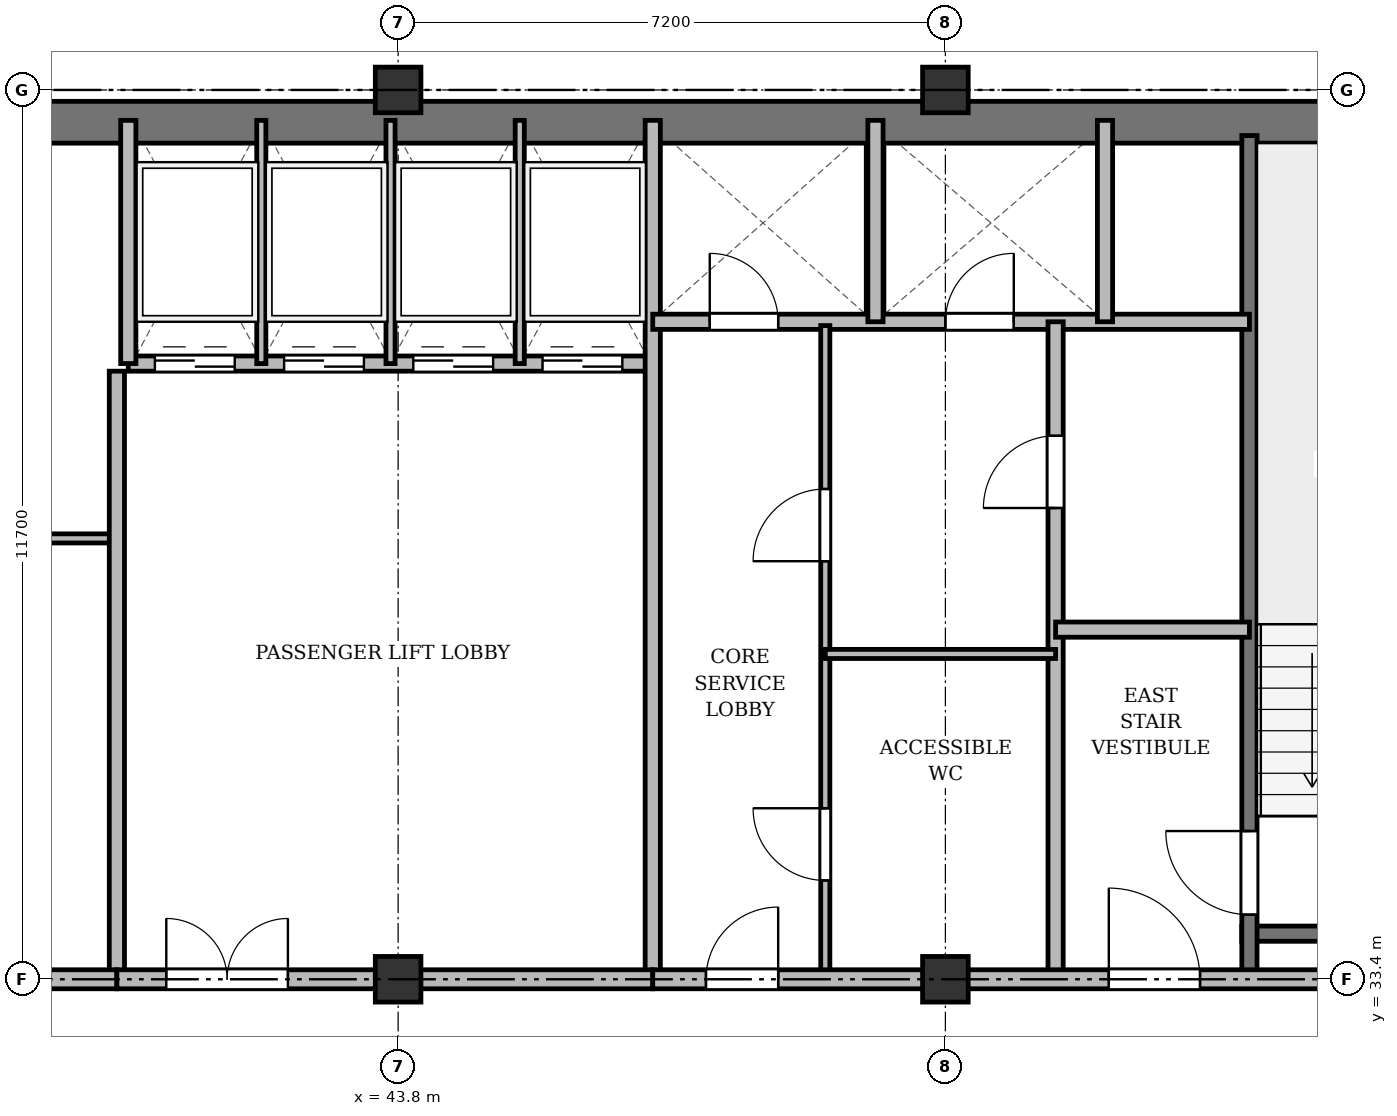
"""IFC4 building model, lengths in metres.
Left out: names, types, materials, properties, quantities, classifications, styles, units other than length and angle.
Written with IfcOpenShell. Run it as: python <this file> out.ifc"""

import sys

from ifc_helpers import new_model, si_unit, direction, frame, frame_2d, origin, origin_2d, place, context, subcontext, project, spatial, rectangle, extrude, source, transform, mapped, element, fill, save


model = new_model("IFC4")
c1 = context("Model", 3, precision=1e-05, world=origin(), true_north=direction((0.0, 1.0)))
c2 = subcontext(c1, "Body", "Model", "MODEL_VIEW")
j1 = project(units=[si_unit("LENGTHUNIT", "METRE"), si_unit("PLANEANGLEUNIT", "RADIAN")], contexts=[c1])
p1 = place(None, origin())
s1 = spatial("IfcSite", under=j1, at=p1, CompositionType="ELEMENT")
p2 = place(p1, origin())
s2 = spatial("IfcBuilding", under=s1, at=p2, CompositionType="ELEMENT")
p3 = place(p2, frame((0.0, 0.0, 291.9)))
s3 = spatial("IfcBuildingStorey", under=s2, at=p3, CompositionType="ELEMENT", Elevation=291.9)
m1 = source(origin(), c2, "Body", "SweptSolid", [
    extrude(rectangle(XDim=0.6, YDim=0.6, at=origin_2d()), origin(), (0.0, 0.0, 1.0), 3.6),
])
for number, where, z_axis, x_axis in (
    (1, (43.8, 33.4, 0.0), (0.0, 0.0, 1.0), (1.0, 0.0, 0.0)),
    (2, (43.8, 45.1, 0.0), (0.0, 0.0, 1.0), (1.0, 0.0, 0.0)),
    (3, (51.0, 33.4, 0.0), (0.0, 0.0, 1.0), (1.0, 0.0, 0.0)),
    (4, (51.0, 45.1, 0.0), (0.0, 0.0, 1.0), (1.0, 0.0, 0.0)),
):
    element("IfcColumn", number, at=place(p3, frame(where, z_axis=z_axis, x_axis=x_axis)), inside=s3, PredefinedType="COLUMN", context=c2, shape_type="MappedRepresentation", body=[
        mapped(m1, transform((0.0, 0.0, 0.0), x_axis=(1.0, 0.0, 0.0), y_axis=(0.0, 1.0, 0.0), z_axis=(0.0, 0.0, 1.0), scale=1.0)),
    ])
p4 = place(p3, frame((15.65, 44.675, 0.0), z_axis=(0.0, 0.0, 1.0), x_axis=(1.0, 0.0, 0.0)))
e5 = element("IfcWall", 5, at=p4, inside=s3, PredefinedType="SHEAR", context=c2, shape_type="SweptSolid", body=[
    extrude(rectangle(XDim=43.1, YDim=0.55, at=frame_2d((21.55, 0.0))), origin(), (0.0, 0.0, 1.0), 3.18),
])
p5 = place(p3, frame((54.9, 34.0, 0.0), z_axis=(0.0, 0.0, 1.0), x_axis=(1.0, 0.0, 0.0)))
e6 = element("IfcWall", 6, at=p5, inside=s3, PredefinedType="SHEAR", context=c2, shape_type="SweptSolid", body=[
    extrude(rectangle(XDim=3.4, YDim=0.2, at=frame_2d((1.7, 0.0))), origin(), (0.0, 0.0, 1.0), 3.18),
])
p6 = place(p3, frame((55.0, 33.4, 0.0), z_axis=(0.0, 0.0, 1.0), x_axis=(0.0, 1.0, 0.0)))
e7 = element("IfcWall", 7, at=p6, inside=s3, PredefinedType="SHEAR", context=c2, shape_type="SweptSolid", body=[
    extrude(rectangle(XDim=11.1, YDim=0.2, at=frame_2d((5.55, 0.0))), origin(), (0.0, 0.0, 1.0), 3.18),
])
p7 = place(p6, frame((0.85, 0.0, 0.0)))
e8 = element("IfcOpeningElement", 8, at=p7, cuts=e7, PredefinedType="OPENING", context=c2, shape_type="SweptSolid", body=[
    extrude(rectangle(XDim=1.1, YDim=2.15, at=frame_2d((0.55, 1.075))), frame((0.0, 0.11, 0.0), z_axis=(0.0, -1.0, 0.0), x_axis=(1.0, 0.0, 0.0)), (0.0, 0.0, 1.0), 0.22),
])
p8 = place(p3, frame((33.3, 39.2, 0.0), z_axis=(0.0, 0.0, 1.0), x_axis=(1.0, 0.0, 0.0)))
e9 = element("IfcWall", 9, at=p8, inside=s3, PredefinedType="PARTITIONING", context=c2, shape_type="SweptSolid", body=[
    extrude(rectangle(XDim=6.8, YDim=0.12, at=frame_2d((3.4, 0.0))), origin(), (0.0, 0.0, 1.0), 3.18),
])
p9 = place(p8, frame((2.6, 0.0, 0.0)))
e10 = element("IfcOpeningElement", 10, at=p9, cuts=e9, PredefinedType="OPENING", context=c2, shape_type="SweptSolid", body=[
    extrude(rectangle(XDim=0.95, YDim=2.15, at=frame_2d((0.475, 1.075))), frame((0.0, 0.07, 0.0), z_axis=(0.0, -1.0, 0.0), x_axis=(1.0, 0.0, 0.0)), (0.0, 0.0, 1.0), 0.14),
])
p10 = place(p3, frame((40.1, 33.4, 0.0), z_axis=(0.0, 0.0, 1.0), x_axis=(0.0, 1.0, 0.0)))
e11 = element("IfcWall", 11, at=p10, inside=s3, PredefinedType="SOLIDWALL", context=c2, shape_type="SweptSolid", body=[
    extrude(rectangle(XDim=8.0, YDim=0.2, at=frame_2d((4.0, 0.0))), origin(), (0.0, 0.0, 1.0), 2.73),
])
p11 = place(p3, frame((40.25, 41.5, 0.0), z_axis=(0.0, 0.0, 1.0), x_axis=(1.0, 0.0, 0.0)))
e12 = element("IfcWall", 12, at=p11, inside=s3, PredefinedType="SOLIDWALL", context=c2, shape_type="SweptSolid", body=[
    extrude(rectangle(XDim=6.9, YDim=0.2, at=frame_2d((3.45, 0.0))), origin(), (0.0, 0.0, 1.0), 3.18),
])
p12 = place(p11, frame((0.35, 0.0, 0.0)))
e13 = element("IfcOpeningElement", 13, at=p12, cuts=e12, PredefinedType="OPENING", context=c2, shape_type="SweptSolid", body=[
    extrude(rectangle(XDim=1.05, YDim=2.15, at=frame_2d((0.525, 1.075))), frame((0.0, 0.11, 0.0), z_axis=(0.0, -1.0, 0.0), x_axis=(1.0, 0.0, 0.0)), (0.0, 0.0, 1.0), 0.22),
])
p13 = place(p11, frame((2.05, 0.0, 0.0)))
e14 = element("IfcOpeningElement", 14, at=p13, cuts=e12, PredefinedType="OPENING", context=c2, shape_type="SweptSolid", body=[
    extrude(rectangle(XDim=1.05, YDim=2.15, at=frame_2d((0.525, 1.075))), frame((0.0, 0.11, 0.0), z_axis=(0.0, -1.0, 0.0), x_axis=(1.0, 0.0, 0.0)), (0.0, 0.0, 1.0), 0.22),
])
p14 = place(p11, frame((3.75, 0.0, 0.0)))
e15 = element("IfcOpeningElement", 15, at=p14, cuts=e12, PredefinedType="OPENING", context=c2, shape_type="SweptSolid", body=[
    extrude(rectangle(XDim=1.05, YDim=2.15, at=frame_2d((0.525, 1.075))), frame((0.0, 0.11, 0.0), z_axis=(0.0, -1.0, 0.0), x_axis=(1.0, 0.0, 0.0)), (0.0, 0.0, 1.0), 0.22),
])
p15 = place(p11, frame((5.45, 0.0, 0.0)))
e16 = element("IfcOpeningElement", 16, at=p15, cuts=e12, PredefinedType="OPENING", context=c2, shape_type="SweptSolid", body=[
    extrude(rectangle(XDim=1.05, YDim=2.15, at=frame_2d((0.525, 1.075))), frame((0.0, 0.11, 0.0), z_axis=(0.0, -1.0, 0.0), x_axis=(1.0, 0.0, 0.0)), (0.0, 0.0, 1.0), 0.22),
])
p16 = place(p3, frame((40.25, 41.5, 0.0), z_axis=(0.0, 0.0, 1.0), x_axis=(0.0, 1.0, 0.0)))
e17 = element("IfcWall", 17, at=p16, inside=s3, PredefinedType="SOLIDWALL", context=c2, shape_type="SweptSolid", body=[
    extrude(rectangle(XDim=3.2, YDim=0.2, at=frame_2d((1.6, 0.0))), origin(), (0.0, 0.0, 1.0), 3.18),
])
for number, where, z_axis, x_axis in (
    (18, (42.0, 41.5, 0.0), (0.0, 0.0, 1.0), (0.0, 1.0, 0.0)),
    (19, (43.7, 41.5, 0.0), (0.0, 0.0, 1.0), (0.0, 1.0, 0.0)),
    (20, (45.4, 41.5, 0.0), (0.0, 0.0, 1.0), (0.0, 1.0, 0.0)),
):
    element("IfcWall", number, at=place(p3, frame(where, z_axis=z_axis, x_axis=x_axis)), inside=s3, PredefinedType="PARTITIONING", context=c2, shape_type="SweptSolid", body=[
        extrude(rectangle(XDim=3.2, YDim=0.12, at=frame_2d((1.6, 0.0))), origin(), (0.0, 0.0, 1.0), 3.18),
    ])
p17 = place(p3, frame((47.15, 33.4, 0.0), z_axis=(0.0, 0.0, 1.0), x_axis=(0.0, 1.0, 0.0)))
e21 = element("IfcWall", 21, at=p17, inside=s3, PredefinedType="SOLIDWALL", context=c2, shape_type="SweptSolid", body=[
    extrude(rectangle(XDim=11.3, YDim=0.2, at=frame_2d((5.65, 0.0))), origin(), (0.0, 0.0, 1.0), 2.73),
])
p18 = place(p3, frame((33.3, 33.4, 0.0), z_axis=(0.0, 0.0, 1.0), x_axis=(1.0, 0.0, 0.0)))
e22 = element("IfcWall", 22, at=p18, inside=s3, PredefinedType="PARTITIONING", context=c2, shape_type="SweptSolid", body=[
    extrude(rectangle(XDim=6.8, YDim=0.25, at=frame_2d((3.4, 0.0))), origin(), (0.0, 0.0, 1.0), 2.73),
])
p19 = place(p18, frame((2.4, 0.0, 0.0)))
e23 = element("IfcOpeningElement", 23, at=p19, cuts=e22, PredefinedType="OPENING", context=c2, shape_type="SweptSolid", body=[
    extrude(rectangle(XDim=1.0, YDim=2.15, at=frame_2d((0.5, 1.075))), frame((0.0, 0.135, 0.0), z_axis=(0.0, -1.0, 0.0), x_axis=(1.0, 0.0, 0.0)), (0.0, 0.0, 1.0), 0.27),
])
p20 = place(p3, frame((40.1, 33.4, 0.0), z_axis=(0.0, 0.0, 1.0), x_axis=(1.0, 0.0, 0.0)))
e24 = element("IfcWall", 24, at=p20, inside=s3, PredefinedType="PARTITIONING", context=c2, shape_type="SweptSolid", body=[
    extrude(rectangle(XDim=7.05, YDim=0.25, at=frame_2d((3.525, 0.0))), origin(), (0.0, 0.0, 1.0), 2.73),
])
p21 = place(p20, frame((0.65, 0.0, 0.0)))
e25 = element("IfcOpeningElement", 25, at=p21, cuts=e24, PredefinedType="OPENING", context=c2, shape_type="SweptSolid", body=[
    extrude(rectangle(XDim=1.6, YDim=2.2, at=frame_2d((0.8, 1.1))), frame((0.0, 0.135, 0.0), z_axis=(0.0, -1.0, 0.0), x_axis=(1.0, 0.0, 0.0)), (0.0, 0.0, 1.0), 0.27),
])
p22 = place(p3, frame((47.15, 42.05, 0.0), z_axis=(0.0, 0.0, 1.0), x_axis=(1.0, 0.0, 0.0)))
e26 = element("IfcWall", 26, at=p22, inside=s3, PredefinedType="SOLIDWALL", context=c2, shape_type="SweptSolid", body=[
    extrude(rectangle(XDim=7.85, YDim=0.2, at=frame_2d((3.925, 0.0))), origin(), (0.0, 0.0, 1.0), 2.68),
])
p23 = place(p22, frame((0.75, 0.0, 0.0)))
e27 = element("IfcOpeningElement", 27, at=p23, cuts=e26, PredefinedType="OPENING", context=c2, shape_type="SweptSolid", body=[
    extrude(rectangle(XDim=0.9, YDim=2.1, at=frame_2d((0.45, 1.05))), frame((0.0, 0.11, 0.0), z_axis=(0.0, -1.0, 0.0), x_axis=(1.0, 0.0, 0.0)), (0.0, 0.0, 1.0), 0.22),
])
p24 = place(p22, frame((3.85, 0.0, 0.0)))
e28 = element("IfcOpeningElement", 28, at=p24, cuts=e26, PredefinedType="OPENING", context=c2, shape_type="SweptSolid", body=[
    extrude(rectangle(XDim=0.9, YDim=2.1, at=frame_2d((0.45, 1.05))), frame((0.0, 0.11, 0.0), z_axis=(0.0, -1.0, 0.0), x_axis=(1.0, 0.0, 0.0)), (0.0, 0.0, 1.0), 0.22),
])
for number, where, z_axis, x_axis in (
    (29, (50.08, 42.05, 0.0), (0.0, 0.0, 1.0), (0.0, 1.0, 0.0)),
    (30, (53.1, 42.05, 0.0), (0.0, 0.0, 1.0), (0.0, 1.0, 0.0)),
):
    element("IfcWall", number, at=place(p3, frame(where, z_axis=z_axis, x_axis=x_axis)), inside=s3, PredefinedType="SOLIDWALL", context=c2, shape_type="SweptSolid", body=[
        extrude(rectangle(XDim=2.65, YDim=0.2, at=frame_2d((1.325, 0.0))), origin(), (0.0, 0.0, 1.0), 3.18),
    ])
p25 = place(p3, frame((52.45, 33.4, 0.0), z_axis=(0.0, 0.0, 1.0), x_axis=(0.0, 1.0, 0.0)))
e31 = element("IfcWall", 31, at=p25, inside=s3, PredefinedType="PARTITIONING", context=c2, shape_type="SweptSolid", body=[
    extrude(rectangle(XDim=8.65, YDim=0.2, at=frame_2d((4.325, 0.0))), origin(), (0.0, 0.0, 1.0), 2.73),
])
p26 = place(p25, frame((6.2, 0.0, 0.0)))
e32 = element("IfcOpeningElement", 32, at=p26, cuts=e31, PredefinedType="OPENING", context=c2, shape_type="SweptSolid", body=[
    extrude(rectangle(XDim=0.95, YDim=2.15, at=frame_2d((0.475, 1.075))), frame((0.0, 0.11, 0.0), z_axis=(0.0, -1.0, 0.0), x_axis=(1.0, 0.0, 0.0)), (0.0, 0.0, 1.0), 0.22),
])
p27 = place(p3, frame((52.45, 38.0, 0.0), z_axis=(0.0, 0.0, 1.0), x_axis=(1.0, 0.0, 0.0)))
e33 = element("IfcWall", 33, at=p27, inside=s3, PredefinedType="PARTITIONING", context=c2, shape_type="SweptSolid", body=[
    extrude(rectangle(XDim=2.55, YDim=0.2, at=frame_2d((1.275, 0.0))), origin(), (0.0, 0.0, 1.0), 3.18),
])
p28 = place(p3, frame((49.42, 33.4, 0.0), z_axis=(0.0, 0.0, 1.0), x_axis=(0.0, 1.0, 0.0)))
e34 = element("IfcWall", 34, at=p28, inside=s3, PredefinedType="PARTITIONING", context=c2, shape_type="SweptSolid", body=[
    extrude(rectangle(XDim=8.6, YDim=0.12, at=frame_2d((4.3, 0.0))), origin(), (0.0, 0.0, 1.0), 2.73),
])
p29 = place(p28, frame((1.3, 0.0, 0.0)))
e35 = element("IfcOpeningElement", 35, at=p29, cuts=e34, PredefinedType="OPENING", context=c2, shape_type="SweptSolid", body=[
    extrude(rectangle(XDim=0.95, YDim=2.15, at=frame_2d((0.475, 1.075))), frame((0.0, 0.07, 0.0), z_axis=(0.0, -1.0, 0.0), x_axis=(1.0, 0.0, 0.0)), (0.0, 0.0, 1.0), 0.14),
])
p30 = place(p28, frame((5.5, 0.0, 0.0)))
e36 = element("IfcOpeningElement", 36, at=p30, cuts=e34, PredefinedType="OPENING", context=c2, shape_type="SweptSolid", body=[
    extrude(rectangle(XDim=0.95, YDim=2.15, at=frame_2d((0.475, 1.075))), frame((0.0, 0.07, 0.0), z_axis=(0.0, -1.0, 0.0), x_axis=(1.0, 0.0, 0.0)), (0.0, 0.0, 1.0), 0.14),
])
p31 = place(p3, frame((49.42, 37.68, 0.0), z_axis=(0.0, 0.0, 1.0), x_axis=(1.0, 0.0, 0.0)))
e37 = element("IfcWall", 37, at=p31, inside=s3, PredefinedType="PARTITIONING", context=c2, shape_type="SweptSolid", body=[
    extrude(rectangle(XDim=3.03, YDim=0.12, at=frame_2d((1.515, 0.0))), origin(), (0.0, 0.0, 1.0), 2.68),
])
p32 = place(p3, frame((47.15, 33.4, 0.0), z_axis=(0.0, 0.0, 1.0), x_axis=(1.0, 0.0, 0.0)))
e38 = element("IfcWall", 38, at=p32, inside=s3, PredefinedType="PARTITIONING", context=c2, shape_type="SweptSolid", body=[
    extrude(rectangle(XDim=11.15, YDim=0.25, at=frame_2d((5.575, 0.0))), origin(), (0.0, 0.0, 1.0), 2.73),
])
p33 = place(p32, frame((0.7, 0.0, 0.0)))
e39 = element("IfcOpeningElement", 39, at=p33, cuts=e38, PredefinedType="OPENING", context=c2, shape_type="SweptSolid", body=[
    extrude(rectangle(XDim=0.95, YDim=2.15, at=frame_2d((0.475, 1.075))), frame((0.0, 0.135, 0.0), z_axis=(0.0, -1.0, 0.0), x_axis=(1.0, 0.0, 0.0)), (0.0, 0.0, 1.0), 0.27),
])
p34 = place(p32, frame((6.0, 0.0, 0.0)))
e40 = element("IfcOpeningElement", 40, at=p34, cuts=e38, PredefinedType="OPENING", context=c2, shape_type="SweptSolid", body=[
    extrude(rectangle(XDim=1.2, YDim=2.15, at=frame_2d((0.6, 1.075))), frame((0.0, 0.135, 0.0), z_axis=(0.0, -1.0, 0.0), x_axis=(1.0, 0.0, 0.0)), (0.0, 0.0, 1.0), 0.27),
])
m2 = source(origin(), c2, "Body", "SweptSolid", [
    extrude(rectangle(XDim=1.1, YDim=2.15, at=frame_2d((0.55, 1.075))), frame((0.0, 0.025, 0.0), z_axis=(0.0, -1.0, 0.0), x_axis=(1.0, 0.0, 0.0)), (0.0, 0.0, 1.0), 0.05),
])
p35 = place(p7, origin())
e41 = element("IfcDoor", 41, at=p35, inside=s3, OperationType="SINGLE_SWING_RIGHT", PredefinedType="DOOR", context=c2, shape_type="MappedRepresentation", body=[
    mapped(m2, transform((0.0, 0.0, 0.0), x_axis=(1.0, 0.0, 0.0), y_axis=(0.0, 1.0, 0.0), z_axis=(0.0, 0.0, 1.0), scale=1.0)),
])
fill(e8, e41)
m3 = source(origin(), c2, "Body", "SweptSolid", [
    extrude(rectangle(XDim=1.05, YDim=2.15, at=frame_2d((0.525, 1.075))), frame((0.0, 0.025, 0.0), z_axis=(0.0, -1.0, 0.0), x_axis=(1.0, 0.0, 0.0)), (0.0, 0.0, 1.0), 0.05),
])
p36 = place(p12, origin())
e42 = element("IfcDoor", 42, at=p36, inside=s3, OperationType="DOUBLE_DOOR_SLIDING", PredefinedType="DOOR", context=c2, shape_type="MappedRepresentation", body=[
    mapped(m3, transform((0.0, 0.0, 0.0), x_axis=(1.0, 0.0, 0.0), y_axis=(0.0, 1.0, 0.0), z_axis=(0.0, 0.0, 1.0), scale=1.0)),
])
fill(e13, e42)
p37 = place(p13, origin())
e43 = element("IfcDoor", 43, at=p37, inside=s3, OperationType="DOUBLE_DOOR_SLIDING", PredefinedType="DOOR", context=c2, shape_type="MappedRepresentation", body=[
    mapped(m3, transform((0.0, 0.0, 0.0), x_axis=(1.0, 0.0, 0.0), y_axis=(0.0, 1.0, 0.0), z_axis=(0.0, 0.0, 1.0), scale=1.0)),
])
fill(e14, e43)
p38 = place(p14, origin())
e44 = element("IfcDoor", 44, at=p38, inside=s3, OperationType="DOUBLE_DOOR_SLIDING", PredefinedType="DOOR", context=c2, shape_type="MappedRepresentation", body=[
    mapped(m3, transform((0.0, 0.0, 0.0), x_axis=(1.0, 0.0, 0.0), y_axis=(0.0, 1.0, 0.0), z_axis=(0.0, 0.0, 1.0), scale=1.0)),
])
fill(e15, e44)
p39 = place(p15, origin())
e45 = element("IfcDoor", 45, at=p39, inside=s3, OperationType="DOUBLE_DOOR_SLIDING", PredefinedType="DOOR", context=c2, shape_type="MappedRepresentation", body=[
    mapped(m3, transform((0.0, 0.0, 0.0), x_axis=(1.0, 0.0, 0.0), y_axis=(0.0, 1.0, 0.0), z_axis=(0.0, 0.0, 1.0), scale=1.0)),
])
fill(e16, e45)
m4 = source(origin(), c2, "Body", "SweptSolid", [
    extrude(rectangle(XDim=1.6, YDim=2.2, at=frame_2d((0.8, 1.1))), frame((0.0, 0.025, 0.0), z_axis=(0.0, -1.0, 0.0), x_axis=(1.0, 0.0, 0.0)), (0.0, 0.0, 1.0), 0.05),
])
p40 = place(p21, origin())
e46 = element("IfcDoor", 46, at=p40, inside=s3, OperationType="DOUBLE_DOOR_SINGLE_SWING", PredefinedType="DOOR", context=c2, shape_type="MappedRepresentation", body=[
    mapped(m4, transform((0.0, 0.0, 0.0), x_axis=(1.0, 0.0, 0.0), y_axis=(0.0, 1.0, 0.0), z_axis=(0.0, 0.0, 1.0), scale=1.0)),
])
fill(e25, e46)
m5 = source(origin(), c2, "Body", "SweptSolid", [
    extrude(rectangle(XDim=0.9, YDim=2.1, at=frame_2d((0.45, 1.05))), frame((0.0, 0.025, 0.0), z_axis=(0.0, -1.0, 0.0), x_axis=(1.0, 0.0, 0.0)), (0.0, 0.0, 1.0), 0.05),
])
p41 = place(p23, origin())
e47 = element("IfcDoor", 47, at=p41, inside=s3, OperationType="SINGLE_SWING_LEFT", PredefinedType="DOOR", context=c2, shape_type="MappedRepresentation", body=[
    mapped(m5, transform((0.0, 0.0, 0.0), x_axis=(1.0, 0.0, 0.0), y_axis=(0.0, 1.0, 0.0), z_axis=(0.0, 0.0, 1.0), scale=1.0)),
])
fill(e27, e47)
p42 = place(p24, origin())
e48 = element("IfcDoor", 48, at=p42, inside=s3, OperationType="SINGLE_SWING_RIGHT", PredefinedType="DOOR", context=c2, shape_type="MappedRepresentation", body=[
    mapped(m5, transform((0.0, 0.0, 0.0), x_axis=(1.0, 0.0, 0.0), y_axis=(0.0, 1.0, 0.0), z_axis=(0.0, 0.0, 1.0), scale=1.0)),
])
fill(e28, e48)
m6 = source(origin(), c2, "Body", "SweptSolid", [
    extrude(rectangle(XDim=0.95, YDim=2.15, at=frame_2d((0.475, 1.075))), frame((0.0, 0.025, 0.0), z_axis=(0.0, -1.0, 0.0), x_axis=(1.0, 0.0, 0.0)), (0.0, 0.0, 1.0), 0.05),
])
p43 = place(p26, origin())
e49 = element("IfcDoor", 49, at=p43, inside=s3, OperationType="SINGLE_SWING_LEFT", PredefinedType="DOOR", context=c2, shape_type="MappedRepresentation", body=[
    mapped(m6, transform((0.0, 0.0, 0.0), x_axis=(1.0, 0.0, 0.0), y_axis=(0.0, 1.0, 0.0), z_axis=(0.0, 0.0, 1.0), scale=1.0)),
])
fill(e32, e49)
p44 = place(p29, origin())
e50 = element("IfcDoor", 50, at=p44, inside=s3, OperationType="SINGLE_SWING_RIGHT", PredefinedType="DOOR", context=c2, shape_type="MappedRepresentation", body=[
    mapped(m6, transform((0.0, 0.0, 0.0), x_axis=(1.0, 0.0, 0.0), y_axis=(0.0, 1.0, 0.0), z_axis=(0.0, 0.0, 1.0), scale=1.0)),
])
fill(e35, e50)
p45 = place(p30, origin())
e51 = element("IfcDoor", 51, at=p45, inside=s3, OperationType="SINGLE_SWING_LEFT", PredefinedType="DOOR", context=c2, shape_type="MappedRepresentation", body=[
    mapped(m6, transform((0.0, 0.0, 0.0), x_axis=(1.0, 0.0, 0.0), y_axis=(0.0, 1.0, 0.0), z_axis=(0.0, 0.0, 1.0), scale=1.0)),
])
fill(e36, e51)
p46 = place(p33, origin())
e52 = element("IfcDoor", 52, at=p46, inside=s3, OperationType="SINGLE_SWING_RIGHT", PredefinedType="DOOR", context=c2, shape_type="MappedRepresentation", body=[
    mapped(m6, transform((0.0, 0.0, 0.0), x_axis=(1.0, 0.0, 0.0), y_axis=(0.0, 1.0, 0.0), z_axis=(0.0, 0.0, 1.0), scale=1.0)),
])
fill(e39, e52)
m7 = source(origin(), c2, "Body", "SweptSolid", [
    extrude(rectangle(XDim=1.2, YDim=2.15, at=frame_2d((0.6, 1.075))), frame((0.0, 0.025, 0.0), z_axis=(0.0, -1.0, 0.0), x_axis=(1.0, 0.0, 0.0)), (0.0, 0.0, 1.0), 0.05),
])
p47 = place(p34, origin())
e53 = element("IfcDoor", 53, at=p47, inside=s3, OperationType="SINGLE_SWING_LEFT", PredefinedType="DOOR", context=c2, shape_type="MappedRepresentation", body=[
    mapped(m7, transform((0.0, 0.0, 0.0), x_axis=(1.0, 0.0, 0.0), y_axis=(0.0, 1.0, 0.0), z_axis=(0.0, 0.0, 1.0), scale=1.0)),
])
fill(e40, e53)
save(model, sys.argv[1])
